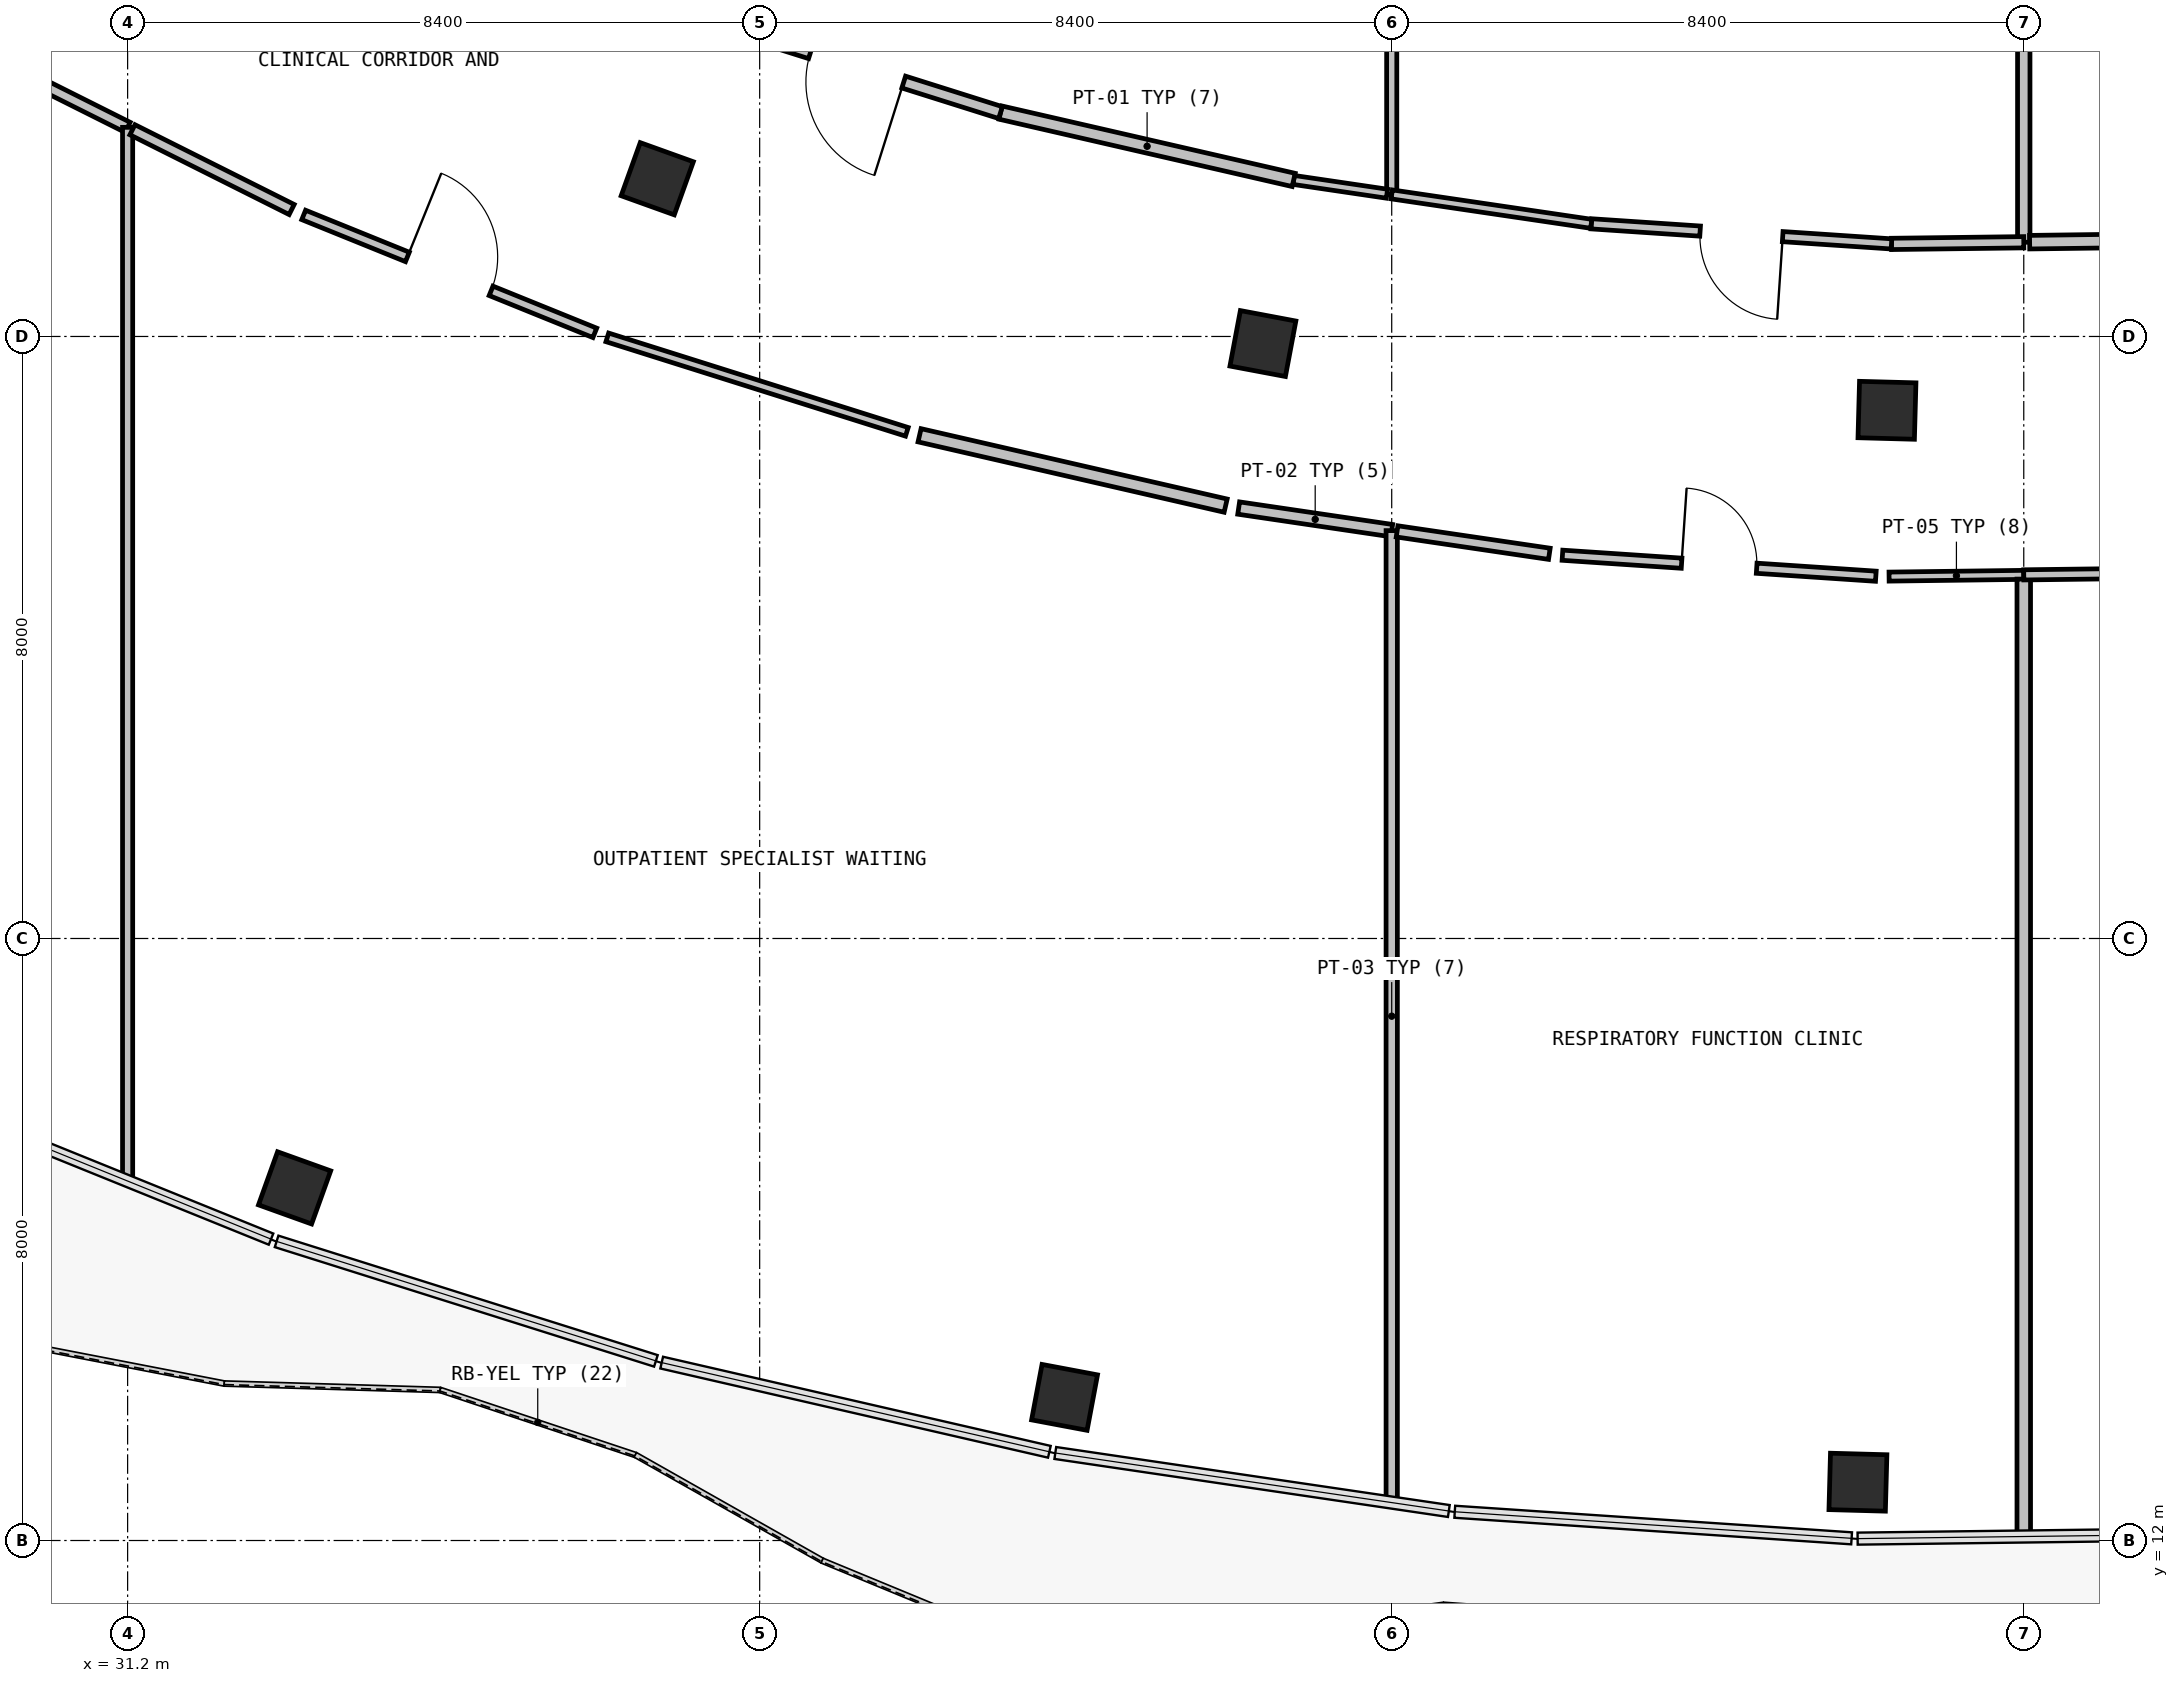
"""IFC4 building model, lengths in metres.
Left out: names, types, materials, properties, quantities, classifications, styles, units other than length and angle.
Written with IfcOpenShell. Run it as: python <this file> out.ifc"""

import sys

from ifc_helpers import new_model, si_unit, direction, frame, frame_2d, origin, origin_2d, place, context, subcontext, project, spatial, rectangle, extrude, element, fill, save


model = new_model("IFC4")
c1 = context("Model", 3, precision=1e-05, world=origin(), true_north=direction((0.0, 1.0)))
c2 = subcontext(c1, "Body", "Model", "MODEL_VIEW")
j1 = project(units=[si_unit("LENGTHUNIT", "METRE"), si_unit("PLANEANGLEUNIT", "RADIAN")], contexts=[c1])
p1 = place(None, origin())
s1 = spatial("IfcSite", under=j1, at=p1, CompositionType="ELEMENT")
p2 = place(p1, origin())
s2 = spatial("IfcBuilding", under=s1, at=p2, CompositionType="ELEMENT")
p3 = place(p2, frame((0.0, 0.0, 5.4)))
s3 = spatial("IfcBuildingStorey", under=s2, at=p3, CompositionType="ELEMENT", Elevation=5.4)
for number, where, z_axis, x_axis in (
    (1, (38.239, 30.096, 0.0), (0.0, 0.0, 1.0), (0.338, 0.941, 0.0)),
    (2, (33.419, 16.686, 0.0), (0.0, 0.0, 1.0), (0.338, 0.941, 0.0)),
    (3, (46.288, 27.906, 0.0), (0.0, 0.0, 1.0), (0.185, 0.983, 0.0)),
    (4, (43.652, 13.902, 0.0), (0.0, 0.0, 1.0), (0.185, 0.983, 0.0)),
    (5, (54.582, 27.019, 0.0), (0.0, 0.0, 1.0), (0.027, 1.0, 0.0)),
    (6, (54.196, 12.775, 0.0), (0.0, 0.0, 1.0), (0.027, 1.0, 0.0)),
):
    element("IfcColumn", number, at=place(p3, frame(where, z_axis=z_axis, x_axis=x_axis)), inside=s3, PredefinedType="COLUMN", context=c2, shape_type="SweptSolid", body=[
        extrude(rectangle(XDim=0.75, YDim=0.75, at=origin_2d()), origin(), (0.0, 0.0, 1.0), 4.8),
    ])
p4 = place(p3, frame((29.648, 31.556, 0.0), z_axis=(0.0, 0.0, 1.0), x_axis=(0.894230168264, -0.447607424165, 0.0)))
e7 = element("IfcWall", 7, at=p4, inside=s3, PredefinedType="PARTITIONING", context=c2, shape_type="SweptSolid", body=[
    extrude(rectangle(XDim=1.736, YDim=0.15, at=frame_2d((0.868, 0.0))), origin(), (0.0, 0.0, 1.0), 4.445),
])
p5 = place(p3, frame((31.2, 30.779, 0.0), z_axis=(0.0, 0.0, 1.0), x_axis=(0.0, -1.0, 0.0)))
e8 = element("IfcWall", 8, at=p5, inside=s3, PredefinedType="PARTITIONING", context=c2, shape_type="SweptSolid", body=[
    extrude(rectangle(XDim=13.99, YDim=0.135, at=frame_2d((6.995, 0.0))), origin(), (0.0, 0.0, 1.0), 4.445),
])
p6 = place(p3, frame((31.264, 30.747, 0.0), z_axis=(0.0, 0.0, 1.0), x_axis=(0.894076176451, -0.447914936905, 0.0)))
e9 = element("IfcWall", 9, at=p6, inside=s3, PredefinedType="PARTITIONING", context=c2, shape_type="SweptSolid", body=[
    extrude(rectangle(XDim=2.367, YDim=0.15, at=frame_2d((1.183, 0.0))), origin(), (0.0, 0.0, 1.0), 4.445),
])
p7 = place(p3, frame((33.54, 29.615, 0.0), z_axis=(0.0, 0.0, 1.0), x_axis=(0.926870756001, -0.375380609075, 0.0)))
e10 = element("IfcWall", 10, at=p7, inside=s3, PredefinedType="PARTITIONING", context=c2, shape_type="SweptSolid", body=[
    extrude(rectangle(XDim=4.174, YDim=0.135, at=frame_2d((2.087, 0.0))), origin(), (0.0, 0.0, 1.0), 4.445),
])
p8 = place(p7, frame((1.487, 0.0, 0.0)))
e11 = element("IfcOpeningElement", 11, at=p8, cuts=e10, PredefinedType="OPENING", context=c2, shape_type="SweptSolid", body=[
    extrude(rectangle(XDim=1.2, YDim=2.15, at=frame_2d((0.6, 1.075))), frame((0.0, 0.077, 0.0), z_axis=(0.0, -1.0, 0.0), x_axis=(1.0, 0.0, 0.0)), (0.0, 0.0, 1.0), 0.155),
])
p9 = place(p3, frame((37.575, 27.988, 0.0), z_axis=(0.0, 0.0, 1.0), x_axis=(0.953721346285, -0.300691858288, 0.0)))
e12 = element("IfcWall", 12, at=p9, inside=s3, PredefinedType="PARTITIONING", context=c2, shape_type="SweptSolid", body=[
    extrude(rectangle(XDim=4.174, YDim=0.12, at=frame_2d((2.087, 0.0))), origin(), (0.0, 0.0, 1.0), 4.445),
])
p10 = place(p3, frame((41.725, 26.687, 0.0), z_axis=(0.0, 0.0, 1.0), x_axis=(0.974584054813, -0.224022141996, 0.0)))
e13 = element("IfcWall", 13, at=p10, inside=s3, PredefinedType="PARTITIONING", context=c2, shape_type="SweptSolid", body=[
    extrude(rectangle(XDim=4.174, YDim=0.18, at=frame_2d((2.087, 0.0))), origin(), (0.0, 0.0, 1.0), 4.445),
])
p11 = place(p3, frame((45.966, 25.72, 0.0), z_axis=(0.0, 0.0, 1.0), x_axis=(0.989293174374, -0.145941821067, 0.0)))
e14 = element("IfcWall", 14, at=p11, inside=s3, PredefinedType="PARTITIONING", context=c2, shape_type="SweptSolid", body=[
    extrude(rectangle(XDim=2.056, YDim=0.165, at=frame_2d((1.028, 0.0))), origin(), (0.0, 0.0, 1.0), 4.445),
])
p12 = place(p3, frame((48.0, 25.42, 0.0), z_axis=(0.0, 0.0, 1.0), x_axis=(0.0, -1.0, 0.0)))
e15 = element("IfcWall", 15, at=p12, inside=s3, PredefinedType="PARTITIONING", context=c2, shape_type="SweptSolid", body=[
    extrude(rectangle(XDim=12.905, YDim=0.15, at=frame_2d((6.453, 0.0))), origin(), (0.0, 0.0, 1.0), 4.445),
])
p13 = place(p3, frame((48.0, 42.881, 0.0), z_axis=(0.0, 0.0, 1.0), x_axis=(0.0, -1.0, 0.0)))
e16 = element("IfcWall", 16, at=p13, inside=s3, PredefinedType="PARTITIONING", context=c2, shape_type="SweptSolid", body=[
    extrude(rectangle(XDim=12.993, YDim=0.135, at=frame_2d((6.497, 0.0))), origin(), (0.0, 0.0, 1.0), 3.745),
])
p14 = place(p3, frame((47.937, 29.897, 0.0), z_axis=(0.0, 0.0, 1.0), x_axis=(-0.989272374287, 0.146082748713, 0.0)))
e17 = element("IfcWall", 17, at=p14, inside=s3, PredefinedType="PARTITIONING", context=c2, shape_type="SweptSolid", body=[
    extrude(rectangle(XDim=1.253, YDim=0.12, at=frame_2d((0.627, 0.0))), origin(), (0.0, 0.0, 1.0), 4.445),
])
p15 = place(p3, frame((46.697, 30.08, 0.0), z_axis=(0.0, 0.0, 1.0), x_axis=(-0.974613054852, 0.223895943044, 0.0)))
e18 = element("IfcWall", 18, at=p15, inside=s3, PredefinedType="PARTITIONING", context=c2, shape_type="SweptSolid", body=[
    extrude(rectangle(XDim=3.998, YDim=0.18, at=frame_2d((1.999, 0.0))), origin(), (0.0, 0.0, 1.0), 4.445),
])
p16 = place(p3, frame((42.801, 30.975, 0.0), z_axis=(0.0, 0.0, 1.0), x_axis=(-0.953762422986, 0.300561541951, 0.0)))
e19 = element("IfcWall", 19, at=p16, inside=s3, PredefinedType="PARTITIONING", context=c2, shape_type="SweptSolid", body=[
    extrude(rectangle(XDim=3.999, YDim=0.165, at=frame_2d((2.0, 0.0))), origin(), (0.0, 0.0, 1.0), 4.445),
])
p17 = place(p16, frame((1.349, 0.0, 0.0)))
e20 = element("IfcOpeningElement", 20, at=p17, cuts=e19, PredefinedType="OPENING", context=c2, shape_type="SweptSolid", body=[
    extrude(rectangle(XDim=1.3, YDim=2.15, at=frame_2d((0.65, 1.075))), frame((0.0, 0.093, 0.0), z_axis=(0.0, -1.0, 0.0), x_axis=(1.0, 0.0, 0.0)), (0.0, 0.0, 1.0), 0.185),
])
p18 = place(p3, frame((48.071, 25.41, 0.0), z_axis=(0.0, 0.0, 1.0), x_axis=(0.989343972267, -0.145597062264, 0.0)))
e21 = element("IfcWall", 21, at=p18, inside=s3, PredefinedType="PARTITIONING", context=c2, shape_type="SweptSolid", body=[
    extrude(rectangle(XDim=2.046, YDim=0.15, at=frame_2d((1.023, 0.0))), origin(), (0.0, 0.0, 1.0), 4.445),
])
p19 = place(p3, frame((50.269, 25.093, 0.0), z_axis=(0.0, 0.0, 1.0), x_axis=(0.997763106532, -0.066848958427, 0.0)))
e22 = element("IfcWall", 22, at=p19, inside=s3, PredefinedType="PARTITIONING", context=c2, shape_type="SweptSolid", body=[
    extrude(rectangle(XDim=4.174, YDim=0.135, at=frame_2d((2.087, 0.0))), origin(), (0.0, 0.0, 1.0), 4.445),
])
p20 = place(p19, frame((1.587, 0.0, 0.0)))
e23 = element("IfcOpeningElement", 23, at=p20, cuts=e22, PredefinedType="OPENING", context=c2, shape_type="SweptSolid", body=[
    extrude(rectangle(XDim=1.0, YDim=2.15, at=frame_2d((0.5, 1.075))), frame((0.0, 0.077, 0.0), z_axis=(0.0, -1.0, 0.0), x_axis=(1.0, 0.0, 0.0)), (0.0, 0.0, 1.0), 0.155),
])
p21 = place(p3, frame((54.61, 24.809, 0.0), z_axis=(0.0, 0.0, 1.0), x_axis=(0.999917804939, 0.012821207702, 0.0)))
e24 = element("IfcWall", 24, at=p21, inside=s3, PredefinedType="PARTITIONING", context=c2, shape_type="SweptSolid", body=[
    extrude(rectangle(XDim=1.79, YDim=0.12, at=frame_2d((0.895, 0.0))), origin(), (0.0, 0.0, 1.0), 4.445),
])
p22 = place(p3, frame((56.4, 24.776, 0.0), z_axis=(0.0, 0.0, 1.0), x_axis=(0.0, -1.0, 0.0)))
e25 = element("IfcWall", 25, at=p22, inside=s3, PredefinedType="PARTITIONING", context=c2, shape_type="SweptSolid", body=[
    extrude(rectangle(XDim=12.712, YDim=0.18, at=frame_2d((6.356, 0.0))), origin(), (0.0, 0.0, 1.0), 4.445),
])
p23 = place(p3, frame((56.4, 42.02, 0.0), z_axis=(0.0, 0.0, 1.0), x_axis=(0.0, -1.0, 0.0)))
e26 = element("IfcWall", 26, at=p23, inside=s3, PredefinedType="PARTITIONING", context=c2, shape_type="SweptSolid", body=[
    extrude(rectangle(XDim=12.768, YDim=0.165, at=frame_2d((6.384, 0.0))), origin(), (0.0, 0.0, 1.0), 4.445),
])
p24 = place(p3, frame((56.4, 29.252, 0.0), z_axis=(0.0, 0.0, 1.0), x_axis=(-0.999921884154, -0.012499023552, 0.0)))
e27 = element("IfcWall", 27, at=p24, inside=s3, PredefinedType="PARTITIONING", context=c2, shape_type="SweptSolid", body=[
    extrude(rectangle(XDim=1.758, YDim=0.15, at=frame_2d((0.879, 0.0))), origin(), (0.0, 0.0, 1.0), 4.445),
])
p25 = place(p3, frame((54.642, 29.23, 0.0), z_axis=(0.0, 0.0, 1.0), x_axis=(-0.99776702154, 0.06679049878, 0.0)))
e28 = element("IfcWall", 28, at=p25, inside=s3, PredefinedType="PARTITIONING", context=c2, shape_type="SweptSolid", body=[
    extrude(rectangle(XDim=3.999, YDim=0.135, at=frame_2d((2.0, 0.0))), origin(), (0.0, 0.0, 1.0), 4.445),
])
p26 = place(p25, frame((1.449, 0.0, 0.0)))
e29 = element("IfcOpeningElement", 29, at=p26, cuts=e28, PredefinedType="OPENING", context=c2, shape_type="SweptSolid", body=[
    extrude(rectangle(XDim=1.1, YDim=2.15, at=frame_2d((0.55, 1.075))), frame((0.0, 0.077, 0.0), z_axis=(0.0, -1.0, 0.0), x_axis=(1.0, 0.0, 0.0)), (0.0, 0.0, 1.0), 0.155),
])
p27 = place(p3, frame((50.652, 29.497, 0.0), z_axis=(0.0, 0.0, 1.0), x_axis=(-0.989313203243, 0.145805987148, 0.0)))
e30 = element("IfcWall", 30, at=p27, inside=s3, PredefinedType="PARTITIONING", context=c2, shape_type="SweptSolid", body=[
    extrude(rectangle(XDim=2.681, YDim=0.12, at=frame_2d((1.34, 0.0))), origin(), (0.0, 0.0, 1.0), 4.445),
])
p28 = place(p3, frame((56.4, 24.832, 0.0), z_axis=(0.0, 0.0, 1.0), x_axis=(0.999920614738, 0.012600167566, 0.0)))
e31 = element("IfcWall", 31, at=p28, inside=s3, PredefinedType="PARTITIONING", context=c2, shape_type="SweptSolid", body=[
    extrude(rectangle(XDim=2.383, YDim=0.135, at=frame_2d((1.192, 0.0))), origin(), (0.0, 0.0, 1.0), 4.445),
])
p29 = place(p3, frame((58.639, 29.281, 0.0), z_axis=(0.0, 0.0, 1.0), x_axis=(-0.999915603192, -0.012991785602, 0.0)))
e32 = element("IfcWall", 32, at=p29, inside=s3, PredefinedType="PARTITIONING", context=c2, shape_type="SweptSolid", body=[
    extrude(rectangle(XDim=2.161, YDim=0.18, at=frame_2d((1.081, 0.0))), origin(), (0.0, 0.0, 1.0), 4.445),
])
p30 = place(p8, origin())
e33 = element("IfcDoor", 33, at=p30, inside=s3, OperationType="SINGLE_SWING_LEFT", PredefinedType="DOOR", context=c2, shape_type="SweptSolid", body=[
    extrude(rectangle(XDim=1.2, YDim=2.15, at=frame_2d((0.6, 1.075))), frame((0.0, 0.025, 0.0), z_axis=(0.0, -1.0, 0.0), x_axis=(1.0, 0.0, 0.0)), (0.0, 0.0, 1.0), 0.05),
])
fill(e11, e33)
p31 = place(p17, origin())
e34 = element("IfcDoor", 34, at=p31, inside=s3, OperationType="SINGLE_SWING_RIGHT", PredefinedType="DOOR", context=c2, shape_type="SweptSolid", body=[
    extrude(rectangle(XDim=1.3, YDim=2.15, at=frame_2d((0.65, 1.075))), frame((0.0, 0.025, 0.0), z_axis=(0.0, -1.0, 0.0), x_axis=(1.0, 0.0, 0.0)), (0.0, 0.0, 1.0), 0.05),
])
fill(e20, e34)
p32 = place(p20, origin())
e35 = element("IfcDoor", 35, at=p32, inside=s3, OperationType="SINGLE_SWING_RIGHT", PredefinedType="DOOR", context=c2, shape_type="SweptSolid", body=[
    extrude(rectangle(XDim=1.0, YDim=2.15, at=frame_2d((0.5, 1.075))), frame((0.0, 0.025, 0.0), z_axis=(0.0, -1.0, 0.0), x_axis=(1.0, 0.0, 0.0)), (0.0, 0.0, 1.0), 0.05),
])
fill(e23, e35)
p33 = place(p26, origin())
e36 = element("IfcDoor", 36, at=p33, inside=s3, OperationType="SINGLE_SWING_LEFT", PredefinedType="DOOR", context=c2, shape_type="SweptSolid", body=[
    extrude(rectangle(XDim=1.1, YDim=2.15, at=frame_2d((0.55, 1.075))), frame((0.0, 0.025, 0.0), z_axis=(0.0, -1.0, 0.0), x_axis=(1.0, 0.0, 0.0)), (0.0, 0.0, 1.0), 0.05),
])
fill(e29, e36)
save(model, sys.argv[1])
